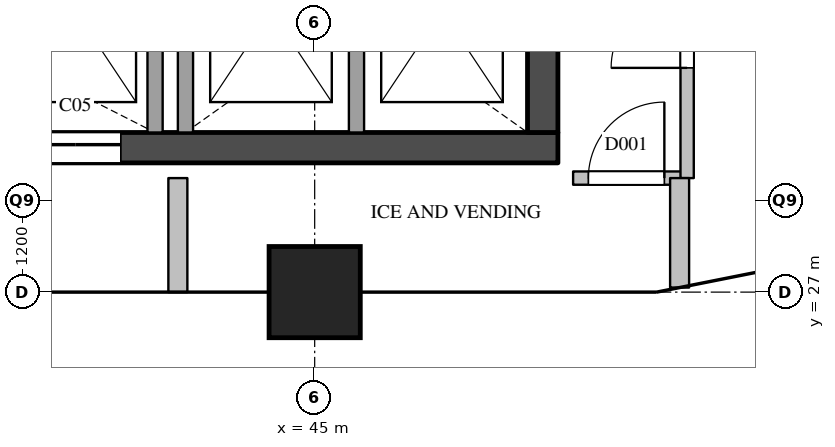
"""IFC4 building model, lengths in metres.
Left out: names, types, materials, properties, quantities, classifications, styles, units other than length and angle.
Written with IfcOpenShell. Run it as: python <this file> out.ifc"""

import sys

from ifc_helpers import new_model, si_unit, direction, frame, frame_2d, origin, origin_2d, place, context, subcontext, project, spatial, rectangle, extrude, element, fill, save


model = new_model("IFC4")
c1 = context("Model", 3, precision=1e-05, world=origin(), true_north=direction((0.0, 1.0)))
c2 = subcontext(c1, "Body", "Model", "MODEL_VIEW")
j1 = project(units=[si_unit("LENGTHUNIT", "METRE"), si_unit("PLANEANGLEUNIT", "RADIAN")], contexts=[c1])
p1 = place(None, origin())
s1 = spatial("IfcSite", under=j1, at=p1, CompositionType="ELEMENT")
p2 = place(p1, origin())
s2 = spatial("IfcBuilding", under=s1, at=p2, CompositionType="ELEMENT")
p3 = place(p2, frame((0.0, 0.0, 207.2)))
s3 = spatial("IfcBuildingStorey", under=s2, at=p3, CompositionType="ELEMENT", Elevation=207.2)
p4 = place(p3, frame((45.0, 27.0, 0.0), z_axis=(0.0, 0.0, 1.0), x_axis=(1.0, 0.0, 0.0)))
e1 = element("IfcColumn", 1, at=p4, inside=s3, PredefinedType="COLUMN", context=c2, shape_type="SweptSolid", body=[
    extrude(rectangle(XDim=1.2, YDim=1.2, at=origin_2d()), origin(), (0.0, 0.0, 1.0), 3.9),
])
p5 = place(p3, frame((36.2, 28.9, 0.0), z_axis=(0.0, 0.0, 1.0), x_axis=(1.0, 0.0, 0.0)))
e2 = element("IfcWall", 2, at=p5, inside=s3, PredefinedType="SHEAR", context=c2, shape_type="SweptSolid", body=[
    extrude(rectangle(XDim=12.0, YDim=0.4, at=frame_2d((6.0, 0.0))), origin(), (0.0, 0.0, 1.0), 3.6),
])
p6 = place(p5, frame((0.85, 0.0, 0.0)))
e3 = element("IfcOpeningElement", 3, at=p6, cuts=e2, PredefinedType="OPENING", context=c2, shape_type="SweptSolid", body=[
    extrude(rectangle(XDim=1.2, YDim=2.1, at=frame_2d((0.6, 1.05))), frame((0.0, 0.21, 0.0), z_axis=(0.0, -1.0, 0.0), x_axis=(1.0, 0.0, 0.0)), (0.0, 0.0, 1.0), 0.42),
])
p7 = place(p5, frame((2.95, 0.0, 0.0)))
e4 = element("IfcOpeningElement", 4, at=p7, cuts=e2, PredefinedType="OPENING", context=c2, shape_type="SweptSolid", body=[
    extrude(rectangle(XDim=1.2, YDim=2.1, at=frame_2d((0.6, 1.05))), frame((0.0, 0.21, 0.0), z_axis=(0.0, -1.0, 0.0), x_axis=(1.0, 0.0, 0.0)), (0.0, 0.0, 1.0), 0.42),
])
p8 = place(p5, frame((5.05, 0.0, 0.0)))
e5 = element("IfcOpeningElement", 5, at=p8, cuts=e2, PredefinedType="OPENING", context=c2, shape_type="SweptSolid", body=[
    extrude(rectangle(XDim=1.2, YDim=2.1, at=frame_2d((0.6, 1.05))), frame((0.0, 0.21, 0.0), z_axis=(0.0, -1.0, 0.0), x_axis=(1.0, 0.0, 0.0)), (0.0, 0.0, 1.0), 0.42),
])
p9 = place(p3, frame((48.0, 29.1, 0.0), z_axis=(0.0, 0.0, 1.0), x_axis=(0.0, 1.0, 0.0)))
e6 = element("IfcWall", 6, at=p9, inside=s3, PredefinedType="SHEAR", context=c2, shape_type="SweptSolid", body=[
    extrude(rectangle(XDim=20.3, YDim=0.4, at=frame_2d((10.15, 0.0))), origin(), (0.0, 0.0, 1.0), 3.6),
])
p10 = place(p9, frame((12.5, 0.0, 0.0)))
e7 = element("IfcOpeningElement", 7, at=p10, cuts=e6, PredefinedType="OPENING", context=c2, shape_type="SweptSolid", body=[
    extrude(rectangle(XDim=0.7, YDim=2.1, at=frame_2d((0.35, 1.05))), frame((0.0, 0.21, 0.0), z_axis=(0.0, -1.0, 0.0), x_axis=(1.0, 0.0, 0.0)), (0.0, 0.0, 1.0), 0.42),
])
p11 = place(p9, frame((3.9, 0.0, 0.0)))
e8 = element("IfcOpeningElement", 8, at=p11, cuts=e6, PredefinedType="OPENING", context=c2, shape_type="SweptSolid", body=[
    extrude(rectangle(XDim=1.8, YDim=2.1, at=frame_2d((0.9, 1.05))), frame((0.0, 0.21, 0.0), z_axis=(0.0, -1.0, 0.0), x_axis=(1.0, 0.0, 0.0)), (0.0, 0.0, 1.0), 0.42),
])
p12 = place(p3, frame((42.9, 29.1, 0.0), z_axis=(0.0, 0.0, 1.0), x_axis=(0.0, 1.0, 0.0)))
e9 = element("IfcWall", 9, at=p12, inside=s3, PredefinedType="SOLIDWALL", context=c2, shape_type="SweptSolid", body=[
    extrude(rectangle(XDim=3.2, YDim=0.2, at=frame_2d((1.6, 0.0))), origin(), (0.0, 0.0, 1.0), 3.6),
])
p13 = place(p3, frame((43.3, 29.1, 0.0), z_axis=(0.0, 0.0, 1.0), x_axis=(0.0, 1.0, 0.0)))
e10 = element("IfcWall", 10, at=p13, inside=s3, PredefinedType="SOLIDWALL", context=c2, shape_type="SweptSolid", body=[
    extrude(rectangle(XDim=9.9, YDim=0.2, at=frame_2d((4.95, 0.0))), origin(), (0.0, 0.0, 1.0), 3.6),
])
p14 = place(p3, frame((45.55, 29.1, 0.0), z_axis=(0.0, 0.0, 1.0), x_axis=(0.0, 1.0, 0.0)))
e11 = element("IfcWall", 11, at=p14, inside=s3, PredefinedType="SOLIDWALL", context=c2, shape_type="SweptSolid", body=[
    extrude(rectangle(XDim=3.2, YDim=0.2, at=frame_2d((1.6, 0.0))), origin(), (0.0, 0.0, 1.0), 3.6),
])
p15 = place(p3, frame((48.4, 28.5, 0.0), z_axis=(0.0, 0.0, 1.0), x_axis=(1.0, 0.0, 0.0)))
e12 = element("IfcWall", 12, at=p15, inside=s3, PredefinedType="PARTITIONING", context=c2, shape_type="SweptSolid", body=[
    extrude(rectangle(XDim=1.5, YDim=0.175, at=frame_2d((0.75, 0.0))), origin(), (0.0, 0.0, 1.0), 3.6),
])
p16 = place(p15, frame((0.2, 0.0, 0.0)))
e13 = element("IfcOpeningElement", 13, at=p16, cuts=e12, PredefinedType="OPENING", context=c2, shape_type="SweptSolid", body=[
    extrude(rectangle(XDim=1.0, YDim=2.1, at=frame_2d((0.5, 1.05))), frame((0.0, 0.097, 0.0), z_axis=(0.0, -1.0, 0.0), x_axis=(1.0, 0.0, 0.0)), (0.0, 0.0, 1.0), 0.195),
])
p17 = place(p3, frame((49.9, 28.5, 0.0), z_axis=(0.0, 0.0, 1.0), x_axis=(0.0, 1.0, 0.0)))
e14 = element("IfcWall", 14, at=p17, inside=s3, PredefinedType="PARTITIONING", context=c2, shape_type="SweptSolid", body=[
    extrude(rectangle(XDim=23.0, YDim=0.175, at=frame_2d((11.5, 0.0))), origin(), (0.0, 0.0, 1.0), 3.6),
])
p18 = place(p17, frame((1.45, 0.0, 0.0)))
e15 = element("IfcOpeningElement", 15, at=p18, cuts=e14, PredefinedType="OPENING", context=c2, shape_type="SweptSolid", body=[
    extrude(rectangle(XDim=1.0, YDim=2.1, at=frame_2d((0.5, 1.05))), frame((0.0, 0.097, 0.0), z_axis=(0.0, -1.0, 0.0), x_axis=(1.0, 0.0, 0.0)), (0.0, 0.0, 1.0), 0.195),
])
p19 = place(p17, frame((8.85, 0.0, 0.0)))
e16 = element("IfcOpeningElement", 16, at=p19, cuts=e14, PredefinedType="OPENING", context=c2, shape_type="SweptSolid", body=[
    extrude(rectangle(XDim=0.9, YDim=2.1, at=frame_2d((0.45, 1.05))), frame((0.0, 0.097, 0.0), z_axis=(0.0, -1.0, 0.0), x_axis=(1.0, 0.0, 0.0)), (0.0, 0.0, 1.0), 0.195),
])
p20 = place(p17, frame((18.4, 0.0, 0.0)))
e17 = element("IfcOpeningElement", 17, at=p20, cuts=e14, PredefinedType="OPENING", context=c2, shape_type="SweptSolid", body=[
    extrude(rectangle(XDim=0.9, YDim=2.1, at=frame_2d((0.45, 1.05))), frame((0.0, 0.097, 0.0), z_axis=(0.0, -1.0, 0.0), x_axis=(1.0, 0.0, 0.0)), (0.0, 0.0, 1.0), 0.195),
])
p21 = place(p3, frame((43.2, 27.0, 0.0), z_axis=(0.0, 0.0, 1.0), x_axis=(0.0, 1.0, 0.0)))
e18 = element("IfcWall", 18, at=p21, inside=s3, PredefinedType="PARTITIONING", context=c2, shape_type="SweptSolid", body=[
    extrude(rectangle(XDim=1.5, YDim=0.25, at=frame_2d((0.75, 0.0))), origin(), (0.0, 0.0, 1.0), 2.6),
])
p22 = place(p3, frame((49.801, 27.06, 0.0), z_axis=(0.0, 0.0, 1.0), x_axis=(0.0, 1.0, 0.0)))
e19 = element("IfcWall", 19, at=p22, inside=s3, PredefinedType="PARTITIONING", context=c2, shape_type="SweptSolid", body=[
    extrude(rectangle(XDim=1.44, YDim=0.25, at=frame_2d((0.72, 0.0))), origin(), (0.0, 0.0, 1.0), 2.6),
])
p23 = place(p8, origin())
e20 = element("IfcDoor", 20, at=p23, inside=s3, OperationType="SLIDING_TO_LEFT", PredefinedType="DOOR", context=c2, shape_type="SweptSolid", body=[
    extrude(rectangle(XDim=1.2, YDim=2.1, at=frame_2d((0.6, 1.05))), frame((0.0, 0.025, 0.0), z_axis=(0.0, -1.0, 0.0), x_axis=(1.0, 0.0, 0.0)), (0.0, 0.0, 1.0), 0.05),
])
fill(e5, e20)
p24 = place(p16, origin())
e21 = element("IfcDoor", 21, at=p24, inside=s3, OperationType="SINGLE_SWING_RIGHT", PredefinedType="DOOR", context=c2, shape_type="SweptSolid", body=[
    extrude(rectangle(XDim=1.0, YDim=2.1, at=frame_2d((0.5, 1.05))), frame((0.0, 0.025, 0.0), z_axis=(0.0, -1.0, 0.0), x_axis=(1.0, 0.0, 0.0)), (0.0, 0.0, 1.0), 0.05),
])
fill(e13, e21)
p25 = place(p18, origin())
e22 = element("IfcDoor", 22, at=p25, inside=s3, OperationType="SINGLE_SWING_LEFT", PredefinedType="DOOR", context=c2, shape_type="SweptSolid", body=[
    extrude(rectangle(XDim=1.0, YDim=2.1, at=frame_2d((0.5, 1.05))), frame((0.0, 0.025, 0.0), z_axis=(0.0, -1.0, 0.0), x_axis=(1.0, 0.0, 0.0)), (0.0, 0.0, 1.0), 0.05),
])
fill(e15, e22)
save(model, sys.argv[1])
